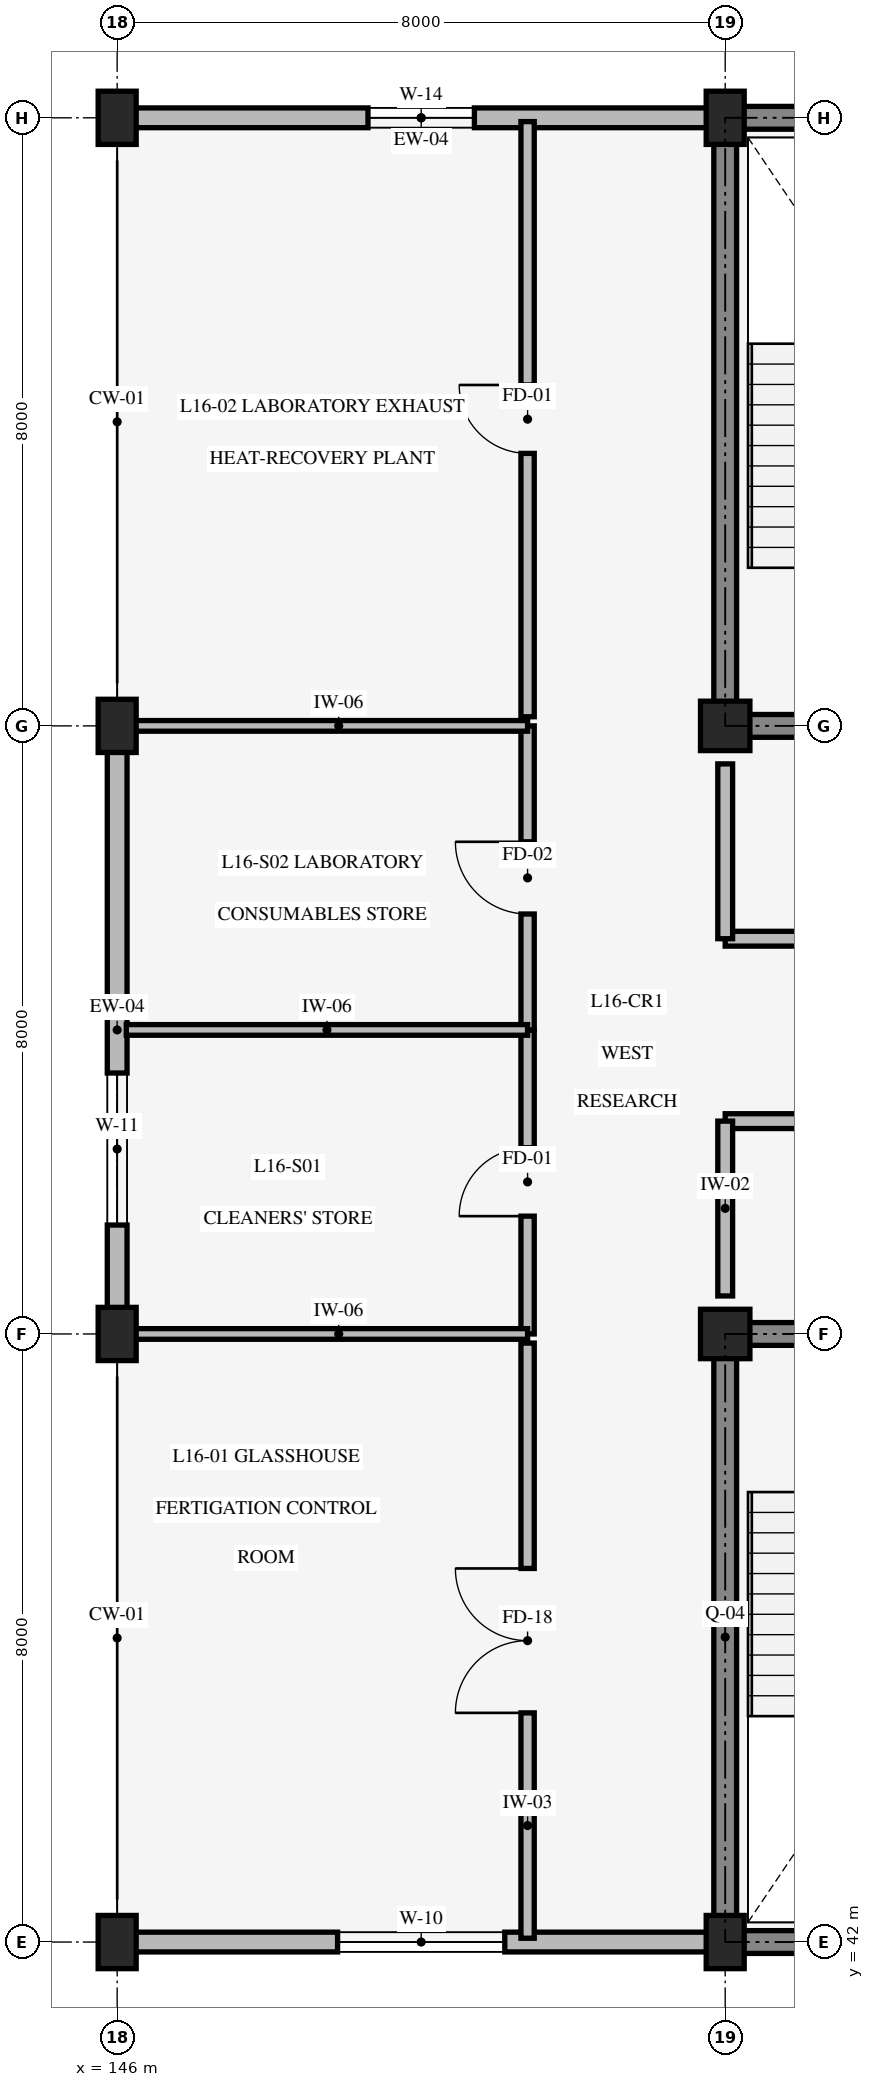
"""IFC4 building model, lengths in metres.
Left out: names, types, materials, properties, quantities, classifications, styles, units other than length and angle.
Written with IfcOpenShell. Run it as: python <this file> out.ifc"""

import sys

from ifc_helpers import new_model, si_unit, direction, frame, frame_2d, origin, origin_2d, place, context, subcontext, project, spatial, rectangle, extrude, element, fill, save


model = new_model("IFC4")
c1 = context("Model", 3, precision=1e-05, world=origin(), true_north=direction((0.0, 1.0)))
c2 = subcontext(c1, "Body", "Model", "MODEL_VIEW")
j1 = project(units=[si_unit("LENGTHUNIT", "METRE"), si_unit("PLANEANGLEUNIT", "RADIAN")], contexts=[c1])
p1 = place(None, origin())
s1 = spatial("IfcSite", under=j1, at=p1, CompositionType="ELEMENT")
p2 = place(p1, origin())
s2 = spatial("IfcBuilding", under=s1, at=p2, CompositionType="ELEMENT")
p3 = place(p2, frame((0.0, 0.0, 65.4)))
s3 = spatial("IfcBuildingStorey", under=s2, at=p3, CompositionType="ELEMENT", Elevation=65.4)
p4 = place(p3, frame((154.0, 42.0, 0.0), z_axis=(0.0, 0.0, 1.0), x_axis=(1.0, 0.0, 0.0)))
e1 = element("IfcWall", 1, at=p4, inside=s3, PredefinedType="SHEAR", context=c2, shape_type="SweptSolid", body=[
    extrude(rectangle(XDim=8.0, YDim=0.3, at=frame_2d((4.0, 0.0))), origin(), (0.0, 0.0, 1.0), 3.95),
])
p5 = place(p3, frame((162.0, 50.0, 0.0), z_axis=(0.0, 0.0, 1.0), x_axis=(-1.0, 0.0, 0.0)))
e2 = element("IfcWall", 2, at=p5, inside=s3, PredefinedType="SHEAR", context=c2, shape_type="SweptSolid", body=[
    extrude(rectangle(XDim=8.0, YDim=0.3, at=frame_2d((4.0, 0.0))), origin(), (0.0, 0.0, 1.0), 3.95),
])
p6 = place(p5, frame((5.3, 0.0, 0.0)))
e3 = element("IfcOpeningElement", 3, at=p6, cuts=e2, PredefinedType="OPENING", context=c2, shape_type="SweptSolid", body=[
    extrude(rectangle(XDim=1.3, YDim=2.15, at=frame_2d((0.65, 1.075))), frame((0.0, 0.16, 0.0), z_axis=(0.0, -1.0, 0.0), x_axis=(1.0, 0.0, 0.0)), (0.0, 0.0, 1.0), 0.32),
])
p7 = place(p5, frame((1.45, 0.0, 0.0)))
e4 = element("IfcOpeningElement", 4, at=p7, cuts=e2, PredefinedType="OPENING", context=c2, shape_type="SweptSolid", body=[
    extrude(rectangle(XDim=1.1, YDim=2.2, at=frame_2d((0.55, 1.1))), frame((0.0, 0.16, 0.0), z_axis=(0.0, -1.0, 0.0), x_axis=(1.0, 0.0, 0.0)), (0.0, 0.0, 1.0), 0.32),
])
p8 = place(p3, frame((154.0, 50.0, 0.0), z_axis=(0.0, 0.0, 1.0), x_axis=(0.0, -1.0, 0.0)))
e5 = element("IfcWall", 5, at=p8, inside=s3, PredefinedType="SHEAR", context=c2, shape_type="SweptSolid", body=[
    extrude(rectangle(XDim=8.0, YDim=0.3, at=frame_2d((4.0, 0.0))), origin(), (0.0, 0.0, 1.0), 3.95),
])
p9 = place(p3, frame((154.0, 58.0, 0.0), z_axis=(0.0, 0.0, 1.0), x_axis=(1.0, 0.0, 0.0)))
e6 = element("IfcWall", 6, at=p9, inside=s3, PredefinedType="SHEAR", context=c2, shape_type="SweptSolid", body=[
    extrude(rectangle(XDim=8.0, YDim=0.3, at=frame_2d((4.0, 0.0))), origin(), (0.0, 0.0, 1.0), 3.95),
])
p10 = place(p9, frame((1.4, 0.0, 0.0)))
e7 = element("IfcOpeningElement", 7, at=p10, cuts=e6, PredefinedType="OPENING", context=c2, shape_type="SweptSolid", body=[
    extrude(rectangle(XDim=1.3, YDim=2.15, at=frame_2d((0.65, 1.075))), frame((0.0, 0.16, 0.0), z_axis=(0.0, -1.0, 0.0), x_axis=(1.0, 0.0, 0.0)), (0.0, 0.0, 1.0), 0.32),
])
p11 = place(p9, frame((5.3, 0.0, 0.0)))
e8 = element("IfcOpeningElement", 8, at=p11, cuts=e6, PredefinedType="OPENING", context=c2, shape_type="SweptSolid", body=[
    extrude(rectangle(XDim=1.1, YDim=2.2, at=frame_2d((0.55, 1.1))), frame((0.0, 0.16, 0.0), z_axis=(0.0, -1.0, 0.0), x_axis=(1.0, 0.0, 0.0)), (0.0, 0.0, 1.0), 0.32),
])
for number, where, z_axis, x_axis in (
    (9, (162.0, 66.0, 0.0), (0.0, 0.0, 1.0), (-1.0, 0.0, 0.0)),
    (10, (154.0, 66.0, 0.0), (0.0, 0.0, 1.0), (0.0, -1.0, 0.0)),
):
    element("IfcWall", number, at=place(p3, frame(where, z_axis=z_axis, x_axis=x_axis)), inside=s3, PredefinedType="SHEAR", context=c2, shape_type="SweptSolid", body=[
        extrude(rectangle(XDim=8.0, YDim=0.3, at=frame_2d((4.0, 0.0))), origin(), (0.0, 0.0, 1.0), 3.95),
    ])
for number, where, z_axis, x_axis in (
    (11, (146.0, 42.0, 0.0), (0.0, 0.0, 1.0), (1.0, 0.0, 0.0)),
    (12, (146.0, 50.0, 0.0), (0.0, 0.0, 1.0), (1.0, 0.0, 0.0)),
    (13, (146.0, 58.0, 0.0), (0.0, 0.0, 1.0), (1.0, 0.0, 0.0)),
    (14, (146.0, 66.0, 0.0), (0.0, 0.0, 1.0), (1.0, 0.0, 0.0)),
    (15, (154.0, 42.0, 0.0), (0.0, 0.0, 1.0), (1.0, 0.0, 0.0)),
):
    element("IfcColumn", number, at=place(p3, frame(where, z_axis=z_axis, x_axis=x_axis)), inside=s3, PredefinedType="COLUMN", context=c2, shape_type="SweptSolid", body=[
        extrude(rectangle(XDim=0.5, YDim=0.7, at=origin_2d()), origin(), (0.0, 0.0, 1.0), 4.2),
    ])
for number, where, z_axis, x_axis in (
    (16, (154.0, 50.0, 0.0), (0.0, 0.0, 1.0), (1.0, 0.0, 0.0)),
    (17, (154.0, 58.0, 0.0), (0.0, 0.0, 1.0), (1.0, 0.0, 0.0)),
):
    element("IfcColumn", number, at=place(p3, frame(where, z_axis=z_axis, x_axis=x_axis)), inside=s3, PredefinedType="COLUMN", context=c2, shape_type="SweptSolid", body=[
        extrude(rectangle(XDim=0.65, YDim=0.65, at=origin_2d()), origin(), (0.0, 0.0, 1.0), 4.2),
    ])
p12 = place(p3, frame((154.0, 66.0, 0.0), z_axis=(0.0, 0.0, 1.0), x_axis=(1.0, 0.0, 0.0)))
e18 = element("IfcColumn", 18, at=p12, inside=s3, PredefinedType="COLUMN", context=c2, shape_type="SweptSolid", body=[
    extrude(rectangle(XDim=0.5, YDim=0.7, at=origin_2d()), origin(), (0.0, 0.0, 1.0), 4.2),
])
p13 = place(p3, frame((154.0, 42.0, 0.0), z_axis=(0.0, 0.0, 1.0), x_axis=(-1.0, 0.0, 0.0)))
e19 = element("IfcWall", 19, at=p13, inside=s3, PredefinedType="STANDARD", context=c2, shape_type="SweptSolid", body=[
    extrude(rectangle(XDim=8.0, YDim=0.26, at=frame_2d((4.0, 0.0))), origin(), (0.0, 0.0, 1.0), 3.34),
])
p14 = place(p13, frame((2.9, 0.0, 0.85)))
e20 = element("IfcOpeningElement", 20, at=p14, cuts=e19, PredefinedType="OPENING", context=c2, shape_type="SweptSolid", body=[
    extrude(rectangle(XDim=2.2, YDim=1.4, at=frame_2d((1.1, 0.7))), frame((0.0, 0.14, 0.0), z_axis=(0.0, -1.0, 0.0), x_axis=(1.0, 0.0, 0.0)), (0.0, 0.0, 1.0), 0.28),
])
p15 = place(p3, frame((146.0, 50.0, 0.0), z_axis=(0.0, 0.0, 1.0), x_axis=(0.0, 1.0, 0.0)))
e21 = element("IfcWall", 21, at=p15, inside=s3, PredefinedType="STANDARD", context=c2, shape_type="SweptSolid", body=[
    extrude(rectangle(XDim=8.0, YDim=0.26, at=frame_2d((4.0, 0.0))), origin(), (0.0, 0.0, 1.0), 3.29),
])
p16 = place(p15, frame((1.433, 0.0, 0.85)))
e22 = element("IfcOpeningElement", 22, at=p16, cuts=e21, PredefinedType="OPENING", context=c2, shape_type="SweptSolid", body=[
    extrude(rectangle(XDim=2.0, YDim=1.5, at=frame_2d((1.0, 0.75))), frame((0.0, 0.14, 0.0), z_axis=(0.0, -1.0, 0.0), x_axis=(1.0, 0.0, 0.0)), (0.0, 0.0, 1.0), 0.28),
])
p17 = place(p3, frame((146.0, 66.0, 0.0), z_axis=(0.0, 0.0, 1.0), x_axis=(1.0, 0.0, 0.0)))
e23 = element("IfcWall", 23, at=p17, inside=s3, PredefinedType="STANDARD", context=c2, shape_type="SweptSolid", body=[
    extrude(rectangle(XDim=8.0, YDim=0.26, at=frame_2d((4.0, 0.0))), origin(), (0.0, 0.0, 1.0), 3.34),
])
p18 = place(p17, frame((3.3, 0.0, 0.85)))
e24 = element("IfcOpeningElement", 24, at=p18, cuts=e23, PredefinedType="OPENING", context=c2, shape_type="SweptSolid", body=[
    extrude(rectangle(XDim=1.4, YDim=1.9, at=frame_2d((0.7, 0.95))), frame((0.0, 0.14, 0.0), z_axis=(0.0, -1.0, 0.0), x_axis=(1.0, 0.0, 0.0)), (0.0, 0.0, 1.0), 0.28),
])
p19 = place(p3, frame((154.0, 52.8, 0.0), z_axis=(0.0, 0.0, 1.0), x_axis=(1.0, 0.0, 0.0)))
e25 = element("IfcWall", 25, at=p19, inside=s3, PredefinedType="STANDARD", context=c2, shape_type="SweptSolid", body=[
    extrude(rectangle(XDim=7.6, YDim=0.195, at=frame_2d((3.8, 0.0))), origin(), (0.0, 0.0, 1.0), 3.9),
])
p20 = place(p19, frame((2.8, 0.0, 0.0)))
e26 = element("IfcOpeningElement", 26, at=p20, cuts=e25, PredefinedType="OPENING", context=c2, shape_type="SweptSolid", body=[
    extrude(rectangle(XDim=1.4, YDim=2.2, at=frame_2d((0.7, 1.1))), frame((0.0, 0.107, 0.0), z_axis=(0.0, -1.0, 0.0), x_axis=(1.0, 0.0, 0.0)), (0.0, 0.0, 1.0), 0.215),
])
p21 = place(p3, frame((154.0, 50.5, 0.0), z_axis=(0.0, 0.0, 1.0), x_axis=(0.0, 1.0, 0.0)))
e27 = element("IfcWall", 27, at=p21, inside=s3, PredefinedType="STANDARD", context=c2, shape_type="SweptSolid", body=[
    extrude(rectangle(XDim=2.3, YDim=0.195, at=frame_2d((1.15, 0.0))), origin(), (0.0, 0.0, 1.0), 3.29),
])
p22 = place(p3, frame((154.0, 55.2, 0.0), z_axis=(0.0, 0.0, 1.0), x_axis=(1.0, 0.0, 0.0)))
e28 = element("IfcWall", 28, at=p22, inside=s3, PredefinedType="STANDARD", context=c2, shape_type="SweptSolid", body=[
    extrude(rectangle(XDim=7.6, YDim=0.195, at=frame_2d((3.8, 0.0))), origin(), (0.0, 0.0, 1.0), 3.9),
])
p23 = place(p22, frame((2.8, 0.0, 0.0)))
e29 = element("IfcOpeningElement", 29, at=p23, cuts=e28, PredefinedType="OPENING", context=c2, shape_type="SweptSolid", body=[
    extrude(rectangle(XDim=1.2, YDim=2.1, at=frame_2d((0.6, 1.05))), frame((0.0, 0.107, 0.0), z_axis=(0.0, -1.0, 0.0), x_axis=(1.0, 0.0, 0.0)), (0.0, 0.0, 1.0), 0.215),
])
p24 = place(p3, frame((154.0, 55.2, 0.0), z_axis=(0.0, 0.0, 1.0), x_axis=(0.0, 1.0, 0.0)))
e30 = element("IfcWall", 30, at=p24, inside=s3, PredefinedType="STANDARD", context=c2, shape_type="SweptSolid", body=[
    extrude(rectangle(XDim=2.3, YDim=0.195, at=frame_2d((1.15, 0.0))), origin(), (0.0, 0.0, 1.0), 3.29),
])
p25 = place(p3, frame((151.4, 42.05, 0.0), z_axis=(0.0, 0.0, 1.0), x_axis=(0.0, 1.0, 0.0)))
e31 = element("IfcWall", 31, at=p25, inside=s3, PredefinedType="STANDARD", context=c2, shape_type="SweptSolid", body=[
    extrude(rectangle(XDim=7.83, YDim=0.175, at=frame_2d((3.915, 0.0))), origin(), (0.0, 0.0, 1.0), 3.9),
])
p26 = place(p25, frame((2.965, 0.0, 0.0)))
e32 = element("IfcOpeningElement", 32, at=p26, cuts=e31, PredefinedType="OPENING", context=c2, shape_type="SweptSolid", body=[
    extrude(rectangle(XDim=1.9, YDim=2.35, at=frame_2d((0.95, 1.175))), frame((0.0, 0.098, 0.0), z_axis=(0.0, -1.0, 0.0), x_axis=(1.0, 0.0, 0.0)), (0.0, 0.0, 1.0), 0.195),
])
p27 = place(p3, frame((151.4, 58.12, 0.0), z_axis=(0.0, 0.0, 1.0), x_axis=(0.0, 1.0, 0.0)))
e33 = element("IfcWall", 33, at=p27, inside=s3, PredefinedType="STANDARD", context=c2, shape_type="SweptSolid", body=[
    extrude(rectangle(XDim=7.83, YDim=0.175, at=frame_2d((3.915, 0.0))), origin(), (0.0, 0.0, 1.0), 3.9),
])
p28 = place(p27, frame((3.465, 0.0, 0.0)))
e34 = element("IfcOpeningElement", 34, at=p28, cuts=e33, PredefinedType="OPENING", context=c2, shape_type="SweptSolid", body=[
    extrude(rectangle(XDim=0.9, YDim=2.1, at=frame_2d((0.45, 1.05))), frame((0.0, 0.098, 0.0), z_axis=(0.0, -1.0, 0.0), x_axis=(1.0, 0.0, 0.0)), (0.0, 0.0, 1.0), 0.195),
])
p29 = place(p3, frame((151.4, 50.0, 0.0), z_axis=(0.0, 0.0, 1.0), x_axis=(0.0, 1.0, 0.0)))
e35 = element("IfcWall", 35, at=p29, inside=s3, PredefinedType="STANDARD", context=c2, shape_type="SweptSolid", body=[
    extrude(rectangle(XDim=4.0, YDim=0.175, at=frame_2d((2.0, 0.0))), origin(), (0.0, 0.0, 1.0), 3.9),
])
p30 = place(p29, frame((1.55, 0.0, 0.0)))
e36 = element("IfcOpeningElement", 36, at=p30, cuts=e35, PredefinedType="OPENING", context=c2, shape_type="SweptSolid", body=[
    extrude(rectangle(XDim=0.9, YDim=2.1, at=frame_2d((0.45, 1.05))), frame((0.0, 0.098, 0.0), z_axis=(0.0, -1.0, 0.0), x_axis=(1.0, 0.0, 0.0)), (0.0, 0.0, 1.0), 0.195),
])
p31 = place(p3, frame((151.4, 54.0, 0.0), z_axis=(0.0, 0.0, 1.0), x_axis=(0.0, 1.0, 0.0)))
e37 = element("IfcWall", 37, at=p31, inside=s3, PredefinedType="STANDARD", context=c2, shape_type="SweptSolid", body=[
    extrude(rectangle(XDim=4.0, YDim=0.175, at=frame_2d((2.0, 0.0))), origin(), (0.0, 0.0, 1.0), 3.9),
])
p32 = place(p31, frame((1.525, 0.0, 0.0)))
e38 = element("IfcOpeningElement", 38, at=p32, cuts=e37, PredefinedType="OPENING", context=c2, shape_type="SweptSolid", body=[
    extrude(rectangle(XDim=0.95, YDim=2.1, at=frame_2d((0.475, 1.05))), frame((0.0, 0.098, 0.0), z_axis=(0.0, -1.0, 0.0), x_axis=(1.0, 0.0, 0.0)), (0.0, 0.0, 1.0), 0.195),
])
p33 = place(p3, frame((146.12, 50.0, 0.0), z_axis=(0.0, 0.0, 1.0), x_axis=(1.0, 0.0, 0.0)))
e39 = element("IfcWall", 39, at=p33, inside=s3, PredefinedType="STANDARD", context=c2, shape_type="SweptSolid", body=[
    extrude(rectangle(XDim=5.28, YDim=0.14, at=frame_2d((2.64, 0.0))), origin(), (0.0, 0.0, 1.0), 3.24),
])
p34 = place(p3, frame((146.12, 54.0, 0.0), z_axis=(0.0, 0.0, 1.0), x_axis=(1.0, 0.0, 0.0)))
e40 = element("IfcWall", 40, at=p34, inside=s3, PredefinedType="STANDARD", context=c2, shape_type="SweptSolid", body=[
    extrude(rectangle(XDim=5.28, YDim=0.14, at=frame_2d((2.64, 0.0))), origin(), (0.0, 0.0, 1.0), 3.9),
])
p35 = place(p3, frame((146.12, 58.0, 0.0), z_axis=(0.0, 0.0, 1.0), x_axis=(1.0, 0.0, 0.0)))
e41 = element("IfcWall", 41, at=p35, inside=s3, PredefinedType="STANDARD", context=c2, shape_type="SweptSolid", body=[
    extrude(rectangle(XDim=5.28, YDim=0.14, at=frame_2d((2.64, 0.0))), origin(), (0.0, 0.0, 1.0), 3.24),
])
p36 = place(p14, origin())
e42 = element("IfcWindow", 42, at=p36, inside=s3, PartitioningType="SINGLE_PANEL", PredefinedType="WINDOW", context=c2, shape_type="SweptSolid", body=[
    extrude(rectangle(XDim=2.2, YDim=1.4, at=frame_2d((1.1, 0.7))), frame((0.0, 0.03, 0.0), z_axis=(0.0, -1.0, 0.0), x_axis=(1.0, 0.0, 0.0)), (0.0, 0.0, 1.0), 0.06),
])
fill(e20, e42)
p37 = place(p16, origin())
e43 = element("IfcWindow", 43, at=p37, inside=s3, PartitioningType="SINGLE_PANEL", PredefinedType="WINDOW", context=c2, shape_type="SweptSolid", body=[
    extrude(rectangle(XDim=2.0, YDim=1.5, at=frame_2d((1.0, 0.75))), frame((0.0, 0.03, 0.0), z_axis=(0.0, -1.0, 0.0), x_axis=(1.0, 0.0, 0.0)), (0.0, 0.0, 1.0), 0.06),
])
fill(e22, e43)
p38 = place(p18, origin())
e44 = element("IfcWindow", 44, at=p38, inside=s3, PartitioningType="SINGLE_PANEL", PredefinedType="WINDOW", context=c2, shape_type="SweptSolid", body=[
    extrude(rectangle(XDim=1.4, YDim=1.9, at=frame_2d((0.7, 0.95))), frame((0.0, 0.03, 0.0), z_axis=(0.0, -1.0, 0.0), x_axis=(1.0, 0.0, 0.0)), (0.0, 0.0, 1.0), 0.06),
])
fill(e24, e44)
p39 = place(p26, origin())
e45 = element("IfcDoor", 45, at=p39, inside=s3, OperationType="DOUBLE_DOOR_SINGLE_SWING", PredefinedType="DOOR", context=c2, shape_type="SweptSolid", body=[
    extrude(rectangle(XDim=1.9, YDim=2.35, at=frame_2d((0.95, 1.175))), frame((0.0, 0.025, 0.0), z_axis=(0.0, -1.0, 0.0), x_axis=(1.0, 0.0, 0.0)), (0.0, 0.0, 1.0), 0.05),
])
fill(e32, e45)
p40 = place(p28, origin())
e46 = element("IfcDoor", 46, at=p40, inside=s3, OperationType="SINGLE_SWING_RIGHT", PredefinedType="DOOR", context=c2, shape_type="SweptSolid", body=[
    extrude(rectangle(XDim=0.9, YDim=2.1, at=frame_2d((0.45, 1.05))), frame((0.0, 0.025, 0.0), z_axis=(0.0, -1.0, 0.0), x_axis=(1.0, 0.0, 0.0)), (0.0, 0.0, 1.0), 0.05),
])
fill(e34, e46)
p41 = place(p30, origin())
e47 = element("IfcDoor", 47, at=p41, inside=s3, OperationType="SINGLE_SWING_LEFT", PredefinedType="DOOR", context=c2, shape_type="SweptSolid", body=[
    extrude(rectangle(XDim=0.9, YDim=2.1, at=frame_2d((0.45, 1.05))), frame((0.0, 0.025, 0.0), z_axis=(0.0, -1.0, 0.0), x_axis=(1.0, 0.0, 0.0)), (0.0, 0.0, 1.0), 0.05),
])
fill(e36, e47)
p42 = place(p32, origin())
e48 = element("IfcDoor", 48, at=p42, inside=s3, OperationType="SINGLE_SWING_RIGHT", PredefinedType="DOOR", context=c2, shape_type="SweptSolid", body=[
    extrude(rectangle(XDim=0.95, YDim=2.1, at=frame_2d((0.475, 1.05))), frame((0.0, 0.025, 0.0), z_axis=(0.0, -1.0, 0.0), x_axis=(1.0, 0.0, 0.0)), (0.0, 0.0, 1.0), 0.05),
])
fill(e38, e48)
save(model, sys.argv[1])
